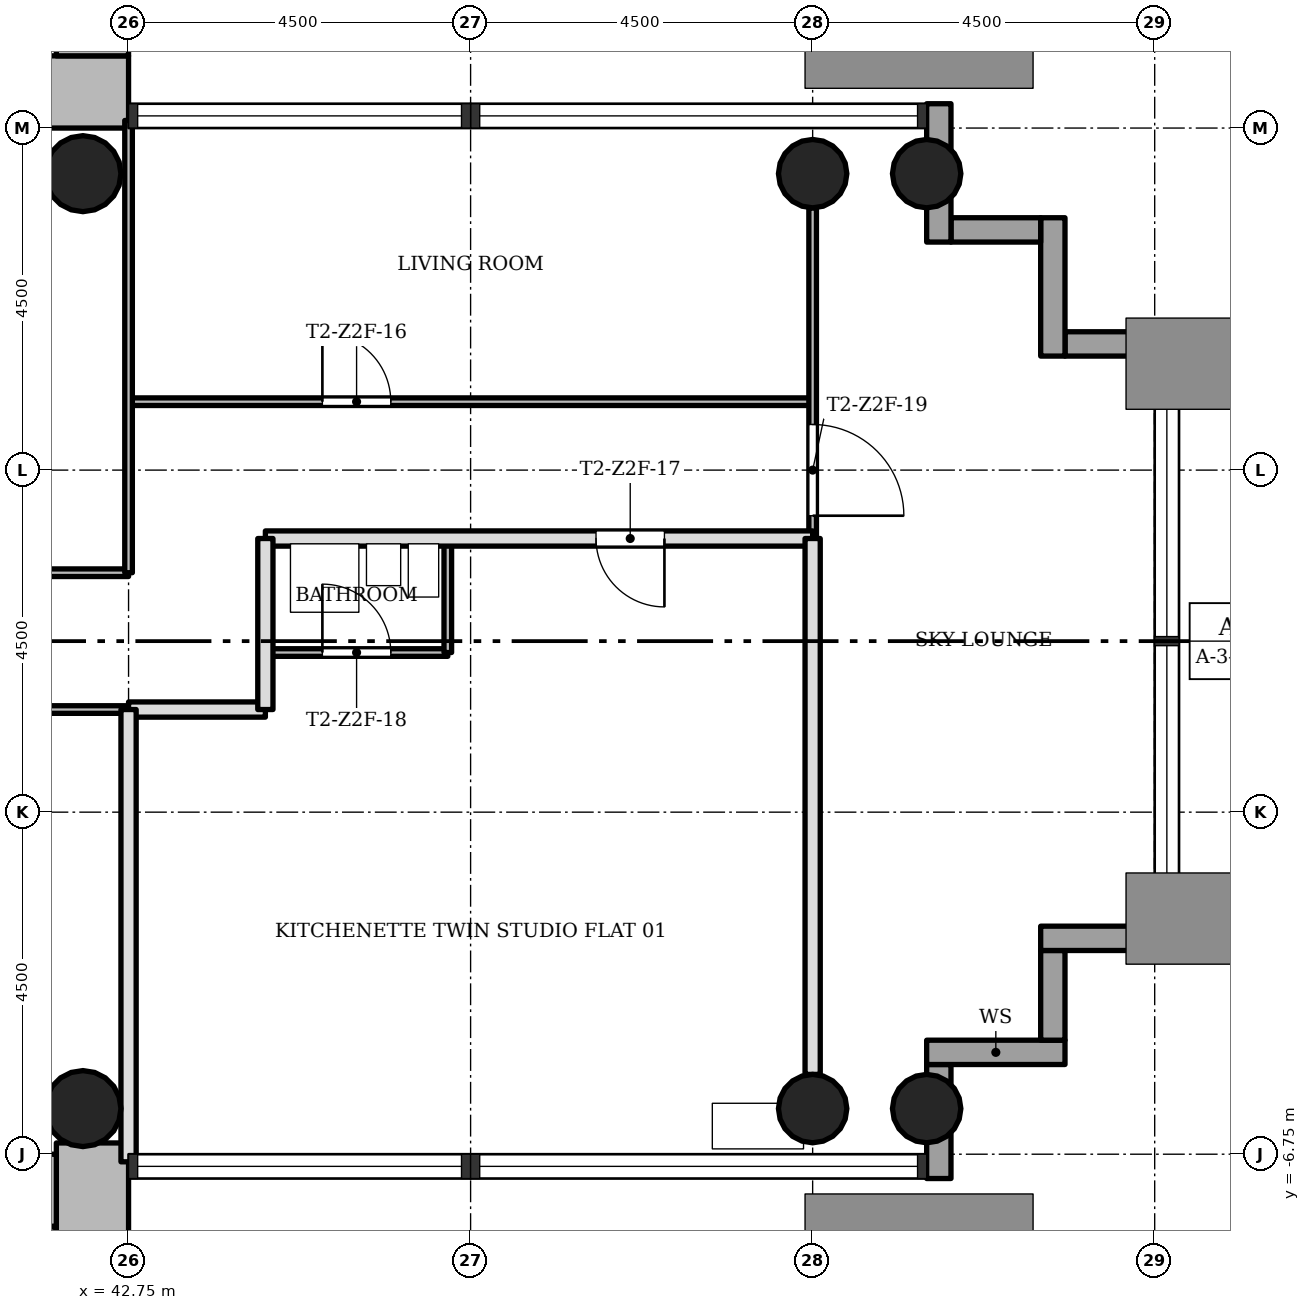
"""IFC4 building model, lengths in metres.
Left out: names, types, materials, properties, quantities, classifications, styles, units other than length and angle.
Written with IfcOpenShell. Run it as: python <this file> out.ifc"""

import sys

from ifc_helpers import new_model, si_unit, direction, frame, frame_2d, origin, origin_2d, place, context, subcontext, project, spatial, rectangle, hollow_circle, extrude, element, fill, save


model = new_model("IFC4")
c1 = context("Model", 3, precision=1e-05, world=origin(), true_north=direction((0.0, 1.0)))
c2 = subcontext(c1, "Body", "Model", "MODEL_VIEW")
j1 = project(units=[si_unit("LENGTHUNIT", "METRE"), si_unit("PLANEANGLEUNIT", "RADIAN")], contexts=[c1])
p1 = place(None, origin())
s1 = spatial("IfcSite", under=j1, at=p1, CompositionType="ELEMENT")
p2 = place(p1, origin())
s2 = spatial("IfcBuilding", under=s1, at=p2, CompositionType="ELEMENT")
p3 = place(p2, frame((0.0, 0.0, 107.2)))
s3 = spatial("IfcBuildingStorey", under=s2, at=p3, CompositionType="ELEMENT", Elevation=107.2)
p4 = place(p3, frame((30.2, 7.225, 0.0), z_axis=(0.0, 0.0, 1.0), x_axis=(1.0, 0.0, 0.0)))
e1 = element("IfcWall", 1, at=p4, inside=s3, PredefinedType="SHEAR", context=c2, shape_type="SweptSolid", body=[
    extrude(rectangle(XDim=12.55, YDim=0.95, at=frame_2d((6.275, 0.0))), origin(), (0.0, 0.0, 1.0), 3.4),
])
p5 = place(p4, frame((4.9, 0.0, 0.0)))
e2 = element("IfcOpeningElement", 2, at=p5, cuts=e1, PredefinedType="OPENING", context=c2, shape_type="SweptSolid", body=[
    extrude(rectangle(XDim=1.8, YDim=2.1, at=frame_2d((0.9, 1.05))), frame((0.0, 0.485, 0.0), z_axis=(0.0, -1.0, 0.0), x_axis=(1.0, 0.0, 0.0)), (0.0, 0.0, 1.0), 0.97),
])
p6 = place(p3, frame((42.275, 7.7, 0.0), z_axis=(0.0, 0.0, 1.0), x_axis=(0.0, 1.0, 0.0)))
e3 = element("IfcWall", 3, at=p6, inside=s3, PredefinedType="SHEAR", context=c2, shape_type="SweptSolid", body=[
    extrude(rectangle(XDim=8.05, YDim=0.95, at=frame_2d((4.025, 0.0))), origin(), (0.0, 0.0, 1.0), 3.4),
])
p7 = place(p3, frame((42.275, -14.8, 0.0), z_axis=(0.0, 0.0, 1.0), x_axis=(0.0, 1.0, 0.0)))
e4 = element("IfcWall", 4, at=p7, inside=s3, PredefinedType="SHEAR", context=c2, shape_type="SweptSolid", body=[
    extrude(rectangle(XDim=8.198, YDim=0.95, at=frame_2d((4.099, 0.0))), origin(), (0.0, 0.0, 1.0), 3.4),
])
p8 = place(p3, frame((41.8, -7.225, 0.0), z_axis=(0.0, 0.0, 1.0), x_axis=(-1.0, 0.0, 0.0)))
e5 = element("IfcWall", 5, at=p8, inside=s3, PredefinedType="SHEAR", context=c2, shape_type="SweptSolid", body=[
    extrude(rectangle(XDim=12.55, YDim=0.95, at=frame_2d((6.275, 0.0))), origin(), (0.0, 0.0, 1.0), 3.4),
])
p9 = place(p8, frame((4.9, 0.0, 0.0)))
e6 = element("IfcOpeningElement", 6, at=p9, cuts=e5, PredefinedType="OPENING", context=c2, shape_type="SweptSolid", body=[
    extrude(rectangle(XDim=1.8, YDim=2.1, at=frame_2d((0.9, 1.05))), frame((0.0, 0.485, 0.0), z_axis=(0.0, -1.0, 0.0), x_axis=(1.0, 0.0, 0.0)), (0.0, 0.0, 1.0), 0.97),
])
for number, where, z_axis, x_axis in (
    (7, (51.75, -6.15, 0.0), (0.0, 0.0, 1.0), (1.0, 0.0, 0.0)),
    (8, (51.75, 6.15, 0.0), (0.0, 0.0, 1.0), (1.0, 0.0, 0.0)),
    (9, (53.25, -6.15, 0.0), (0.0, 0.0, 1.0), (1.0, 0.0, 0.0)),
    (10, (53.25, 6.15, 0.0), (0.0, 0.0, 1.0), (1.0, 0.0, 0.0)),
):
    element("IfcColumn", number, at=place(p3, frame(where, z_axis=z_axis, x_axis=x_axis)), inside=s3, PredefinedType="COLUMN", context=c2, shape_type="SweptSolid", body=[
        extrude(hollow_circle(Radius=0.45, WallThickness=0.032, at=origin_2d()), origin(), (0.0, 0.0, 1.0), 3.4),
    ])
for number, where, z_axis, x_axis in (
    (11, (42.15, -6.15, 0.0), (0.0, 0.0, 1.0), (1.0, 0.0, 0.0)),
    (12, (42.15, 6.15, 0.0), (0.0, 0.0, 1.0), (1.0, 0.0, 0.0)),
):
    element("IfcColumn", number, at=place(p3, frame(where, z_axis=z_axis, x_axis=x_axis)), inside=s3, PredefinedType="COLUMN", context=c2, shape_type="SweptSolid", body=[
        extrude(hollow_circle(Radius=0.5, WallThickness=0.036, at=origin_2d()), origin(), (0.0, 0.0, 1.0), 3.4),
    ])
p10 = place(p3, frame((53.41, -7.07, -0.3), z_axis=(0.0, 0.0, 1.0), x_axis=(0.0, 1.0, 0.0)))
e13 = element("IfcWall", 13, at=p10, inside=s3, PredefinedType="STANDARD", context=c2, shape_type="SweptSolid", body=[
    extrude(rectangle(XDim=1.5, YDim=0.32, at=frame_2d((0.75, 0.0))), origin(), (0.0, 0.0, 1.0), 3.4),
])
p11 = place(p3, frame((53.25, -5.41, -0.3), z_axis=(0.0, 0.0, 1.0), x_axis=(1.0, 0.0, 0.0)))
e14 = element("IfcWall", 14, at=p11, inside=s3, PredefinedType="STANDARD", context=c2, shape_type="SweptSolid", body=[
    extrude(rectangle(XDim=1.82, YDim=0.32, at=frame_2d((0.91, 0.0))), origin(), (0.0, 0.0, 1.0), 3.4),
])
p12 = place(p3, frame((54.91, -5.25, -0.3), z_axis=(0.0, 0.0, 1.0), x_axis=(0.0, 1.0, 0.0)))
e15 = element("IfcWall", 15, at=p12, inside=s3, PredefinedType="STANDARD", context=c2, shape_type="SweptSolid", body=[
    extrude(rectangle(XDim=1.18, YDim=0.32, at=frame_2d((0.59, 0.0))), origin(), (0.0, 0.0, 1.0), 3.4),
])
p13 = place(p3, frame((54.75, -3.91, -0.3), z_axis=(0.0, 0.0, 1.0), x_axis=(1.0, 0.0, 0.0)))
e16 = element("IfcWall", 16, at=p13, inside=s3, PredefinedType="STANDARD", context=c2, shape_type="SweptSolid", body=[
    extrude(rectangle(XDim=1.82, YDim=0.32, at=frame_2d((0.91, 0.0))), origin(), (0.0, 0.0, 1.0), 3.4),
])
p14 = place(p3, frame((56.57, 3.91, -0.3), z_axis=(0.0, 0.0, 1.0), x_axis=(-1.0, 0.0, 0.0)))
e17 = element("IfcWall", 17, at=p14, inside=s3, PredefinedType="STANDARD", context=c2, shape_type="SweptSolid", body=[
    extrude(rectangle(XDim=1.5, YDim=0.32, at=frame_2d((0.75, 0.0))), origin(), (0.0, 0.0, 1.0), 3.4),
])
p15 = place(p3, frame((54.91, 3.75, -0.3), z_axis=(0.0, 0.0, 1.0), x_axis=(0.0, 1.0, 0.0)))
e18 = element("IfcWall", 18, at=p15, inside=s3, PredefinedType="STANDARD", context=c2, shape_type="SweptSolid", body=[
    extrude(rectangle(XDim=1.82, YDim=0.32, at=frame_2d((0.91, 0.0))), origin(), (0.0, 0.0, 1.0), 3.4),
])
p16 = place(p3, frame((54.75, 5.41, -0.3), z_axis=(0.0, 0.0, 1.0), x_axis=(-1.0, 0.0, 0.0)))
e19 = element("IfcWall", 19, at=p16, inside=s3, PredefinedType="STANDARD", context=c2, shape_type="SweptSolid", body=[
    extrude(rectangle(XDim=1.18, YDim=0.32, at=frame_2d((0.59, 0.0))), origin(), (0.0, 0.0, 1.0), 3.4),
])
p17 = place(p3, frame((53.41, 5.25, -0.3), z_axis=(0.0, 0.0, 1.0), x_axis=(0.0, 1.0, 0.0)))
e20 = element("IfcWall", 20, at=p17, inside=s3, PredefinedType="STANDARD", context=c2, shape_type="SweptSolid", body=[
    extrude(rectangle(XDim=1.82, YDim=0.32, at=frame_2d((0.91, 0.0))), origin(), (0.0, 0.0, 1.0), 3.4),
])
p18 = place(p3, frame((42.75, -0.9, 0.0), z_axis=(0.0, 0.0, 1.0), x_axis=(-1.0, 0.0, 0.0)))
e21 = element("IfcWall", 21, at=p18, inside=s3, PredefinedType="PARTITIONING", context=c2, shape_type="SweptSolid", body=[
    extrude(rectangle(XDim=5.25, YDim=0.1, at=frame_2d((2.625, 0.0))), origin(), (0.0, 0.0, 1.0), 3.0),
])
p19 = place(p3, frame((44.55, -0.9, 0.0), z_axis=(0.0, 0.0, 1.0), x_axis=(-1.0, 0.0, 0.0)))
e22 = element("IfcWall", 22, at=p19, inside=s3, PredefinedType="SOLIDWALL", context=c2, shape_type="SweptSolid", body=[
    extrude(rectangle(XDim=1.8, YDim=0.2, at=frame_2d((0.9, 0.0))), origin(), (0.0, 0.0, 1.0), 3.0),
])
p20 = place(p3, frame((46.95, -0.15, 0.0), z_axis=(0.0, 0.0, 1.0), x_axis=(-1.0, 0.0, 0.0)))
e23 = element("IfcWall", 23, at=p20, inside=s3, PredefinedType="PARTITIONING", context=c2, shape_type="SweptSolid", body=[
    extrude(rectangle(XDim=2.4, YDim=0.1, at=frame_2d((1.2, 0.0))), origin(), (0.0, 0.0, 1.0), 3.0),
])
p21 = place(p20, frame((0.75, 0.0, 0.0)))
e24 = element("IfcOpeningElement", 24, at=p21, cuts=e23, PredefinedType="OPENING", context=c2, shape_type="SweptSolid", body=[
    extrude(rectangle(XDim=0.9, YDim=2.1, at=frame_2d((0.45, 1.05))), frame((0.0, 0.06, 0.0), z_axis=(0.0, -1.0, 0.0), x_axis=(1.0, 0.0, 0.0)), (0.0, 0.0, 1.0), 0.12),
])
p22 = place(p3, frame((42.75, 0.9, 0.0), z_axis=(0.0, 0.0, 1.0), x_axis=(-1.0, 0.0, 0.0)))
e25 = element("IfcWall", 25, at=p22, inside=s3, PredefinedType="PARTITIONING", context=c2, shape_type="SweptSolid", body=[
    extrude(rectangle(XDim=5.25, YDim=0.1, at=frame_2d((2.625, 0.0))), origin(), (0.0, 0.0, 1.0), 3.0),
])
p23 = place(p3, frame((51.75, 1.35, 0.0), z_axis=(0.0, 0.0, 1.0), x_axis=(-1.0, 0.0, 0.0)))
e26 = element("IfcWall", 26, at=p23, inside=s3, PredefinedType="SOLIDWALL", context=c2, shape_type="SweptSolid", body=[
    extrude(rectangle(XDim=7.2, YDim=0.2, at=frame_2d((3.6, 0.0))), origin(), (0.0, 0.0, 1.0), 3.0),
])
p24 = place(p23, frame((1.95, 0.0, 0.0)))
e27 = element("IfcOpeningElement", 27, at=p24, cuts=e26, PredefinedType="OPENING", context=c2, shape_type="SweptSolid", body=[
    extrude(rectangle(XDim=0.9, YDim=2.1, at=frame_2d((0.45, 1.05))), frame((0.0, 0.11, 0.0), z_axis=(0.0, -1.0, 0.0), x_axis=(1.0, 0.0, 0.0)), (0.0, 0.0, 1.0), 0.22),
])
p25 = place(p3, frame((51.75, 3.15, 0.0), z_axis=(0.0, 0.0, 1.0), x_axis=(-1.0, 0.0, 0.0)))
e28 = element("IfcWall", 28, at=p25, inside=s3, PredefinedType="PARTITIONING", context=c2, shape_type="SweptSolid", body=[
    extrude(rectangle(XDim=9.0, YDim=0.1, at=frame_2d((4.5, 0.0))), origin(), (0.0, 0.0, 1.0), 3.0),
])
p26 = place(p25, frame((5.55, 0.0, 0.0)))
e29 = element("IfcOpeningElement", 29, at=p26, cuts=e28, PredefinedType="OPENING", context=c2, shape_type="SweptSolid", body=[
    extrude(rectangle(XDim=0.9, YDim=2.1, at=frame_2d((0.45, 1.05))), frame((0.0, 0.06, 0.0), z_axis=(0.0, -1.0, 0.0), x_axis=(1.0, 0.0, 0.0)), (0.0, 0.0, 1.0), 0.12),
])
p27 = place(p3, frame((51.75, 1.35, 0.0), z_axis=(0.0, 0.0, 1.0), x_axis=(0.0, 1.0, 0.0)))
e30 = element("IfcWall", 30, at=p27, inside=s3, PredefinedType="PARTITIONING", context=c2, shape_type="SweptSolid", body=[
    extrude(rectangle(XDim=4.35, YDim=0.1, at=frame_2d((2.175, 0.0))), origin(), (0.0, 0.0, 1.0), 3.0),
])
p28 = place(p27, frame((0.3, 0.0, 0.0)))
e31 = element("IfcOpeningElement", 31, at=p28, cuts=e30, PredefinedType="OPENING", context=c2, shape_type="SweptSolid", body=[
    extrude(rectangle(XDim=1.2, YDim=2.1, at=frame_2d((0.6, 1.05))), frame((0.0, 0.06, 0.0), z_axis=(0.0, -1.0, 0.0), x_axis=(1.0, 0.0, 0.0)), (0.0, 0.0, 1.0), 0.12),
])
p29 = place(p3, frame((51.75, -5.7, 0.0), z_axis=(0.0, 0.0, 1.0), x_axis=(0.0, 1.0, 0.0)))
e32 = element("IfcWall", 32, at=p29, inside=s3, PredefinedType="SOLIDWALL", context=c2, shape_type="SweptSolid", body=[
    extrude(rectangle(XDim=7.05, YDim=0.2, at=frame_2d((3.525, 0.0))), origin(), (0.0, 0.0, 1.0), 3.0),
])
p30 = place(p3, frame((46.95, -0.15, 0.0), z_axis=(0.0, 0.0, 1.0), x_axis=(0.0, 1.0, 0.0)))
e33 = element("IfcWall", 33, at=p30, inside=s3, PredefinedType="PARTITIONING", context=c2, shape_type="SweptSolid", body=[
    extrude(rectangle(XDim=1.5, YDim=0.1, at=frame_2d((0.75, 0.0))), origin(), (0.0, 0.0, 1.0), 3.0),
])
p31 = place(p3, frame((44.55, -0.9, 0.0), z_axis=(0.0, 0.0, 1.0), x_axis=(0.0, 1.0, 0.0)))
e34 = element("IfcWall", 34, at=p31, inside=s3, PredefinedType="SOLIDWALL", context=c2, shape_type="SweptSolid", body=[
    extrude(rectangle(XDim=2.25, YDim=0.2, at=frame_2d((1.125, 0.0))), origin(), (0.0, 0.0, 1.0), 3.0),
])
p32 = place(p3, frame((42.75, 0.9, 0.0), z_axis=(0.0, 0.0, 1.0), x_axis=(0.0, 1.0, 0.0)))
e35 = element("IfcWall", 35, at=p32, inside=s3, PredefinedType="PARTITIONING", context=c2, shape_type="SweptSolid", body=[
    extrude(rectangle(XDim=5.95, YDim=0.1, at=frame_2d((2.975, 0.0))), origin(), (0.0, 0.0, 1.0), 3.0),
])
p33 = place(p3, frame((42.75, -6.85, 0.0), z_axis=(0.0, 0.0, 1.0), x_axis=(0.0, 1.0, 0.0)))
e36 = element("IfcWall", 36, at=p33, inside=s3, PredefinedType="SOLIDWALL", context=c2, shape_type="SweptSolid", body=[
    extrude(rectangle(XDim=5.95, YDim=0.2, at=frame_2d((2.975, 0.0))), origin(), (0.0, 0.0, 1.0), 3.0),
])
p34 = place(p3, frame((37.9, -7.825, 0.0), z_axis=(0.0, 0.0, 1.0), x_axis=(1.0, 0.0, 0.0)))
e37 = element("IfcWall", 37, at=p34, inside=s3, PredefinedType="SHEAR", context=c2, shape_type="SweptSolid", body=[
    extrude(rectangle(XDim=3.9, YDim=0.25, at=frame_2d((1.95, 0.0))), origin(), (0.0, 0.0, 1.0), 3.4),
])
p35 = place(p26, origin())
e38 = element("IfcDoor", 38, at=p35, inside=s3, OperationType="SINGLE_SWING_RIGHT", PredefinedType="DOOR", context=c2, shape_type="SweptSolid", body=[
    extrude(rectangle(XDim=0.9, YDim=2.1, at=frame_2d((0.45, 1.05))), frame((0.0, 0.025, 0.0), z_axis=(0.0, -1.0, 0.0), x_axis=(1.0, 0.0, 0.0)), (0.0, 0.0, 1.0), 0.05),
])
fill(e29, e38)
p36 = place(p24, origin())
e39 = element("IfcDoor", 39, at=p36, inside=s3, OperationType="SINGLE_SWING_RIGHT", PredefinedType="DOOR", context=c2, shape_type="SweptSolid", body=[
    extrude(rectangle(XDim=0.9, YDim=2.1, at=frame_2d((0.45, 1.05))), frame((0.0, 0.025, 0.0), z_axis=(0.0, -1.0, 0.0), x_axis=(1.0, 0.0, 0.0)), (0.0, 0.0, 1.0), 0.05),
])
fill(e27, e39)
p37 = place(p21, origin())
e40 = element("IfcDoor", 40, at=p37, inside=s3, OperationType="SINGLE_SWING_RIGHT", PredefinedType="DOOR", context=c2, shape_type="SweptSolid", body=[
    extrude(rectangle(XDim=0.9, YDim=2.1, at=frame_2d((0.45, 1.05))), frame((0.0, 0.025, 0.0), z_axis=(0.0, -1.0, 0.0), x_axis=(1.0, 0.0, 0.0)), (0.0, 0.0, 1.0), 0.05),
])
fill(e24, e40)
p38 = place(p28, origin())
e41 = element("IfcDoor", 41, at=p38, inside=s3, OperationType="SINGLE_SWING_LEFT", PredefinedType="DOOR", context=c2, shape_type="SweptSolid", body=[
    extrude(rectangle(XDim=1.2, YDim=2.1, at=frame_2d((0.6, 1.05))), frame((0.0, 0.025, 0.0), z_axis=(0.0, -1.0, 0.0), x_axis=(1.0, 0.0, 0.0)), (0.0, 0.0, 1.0), 0.05),
])
fill(e31, e41)
save(model, sys.argv[1])
